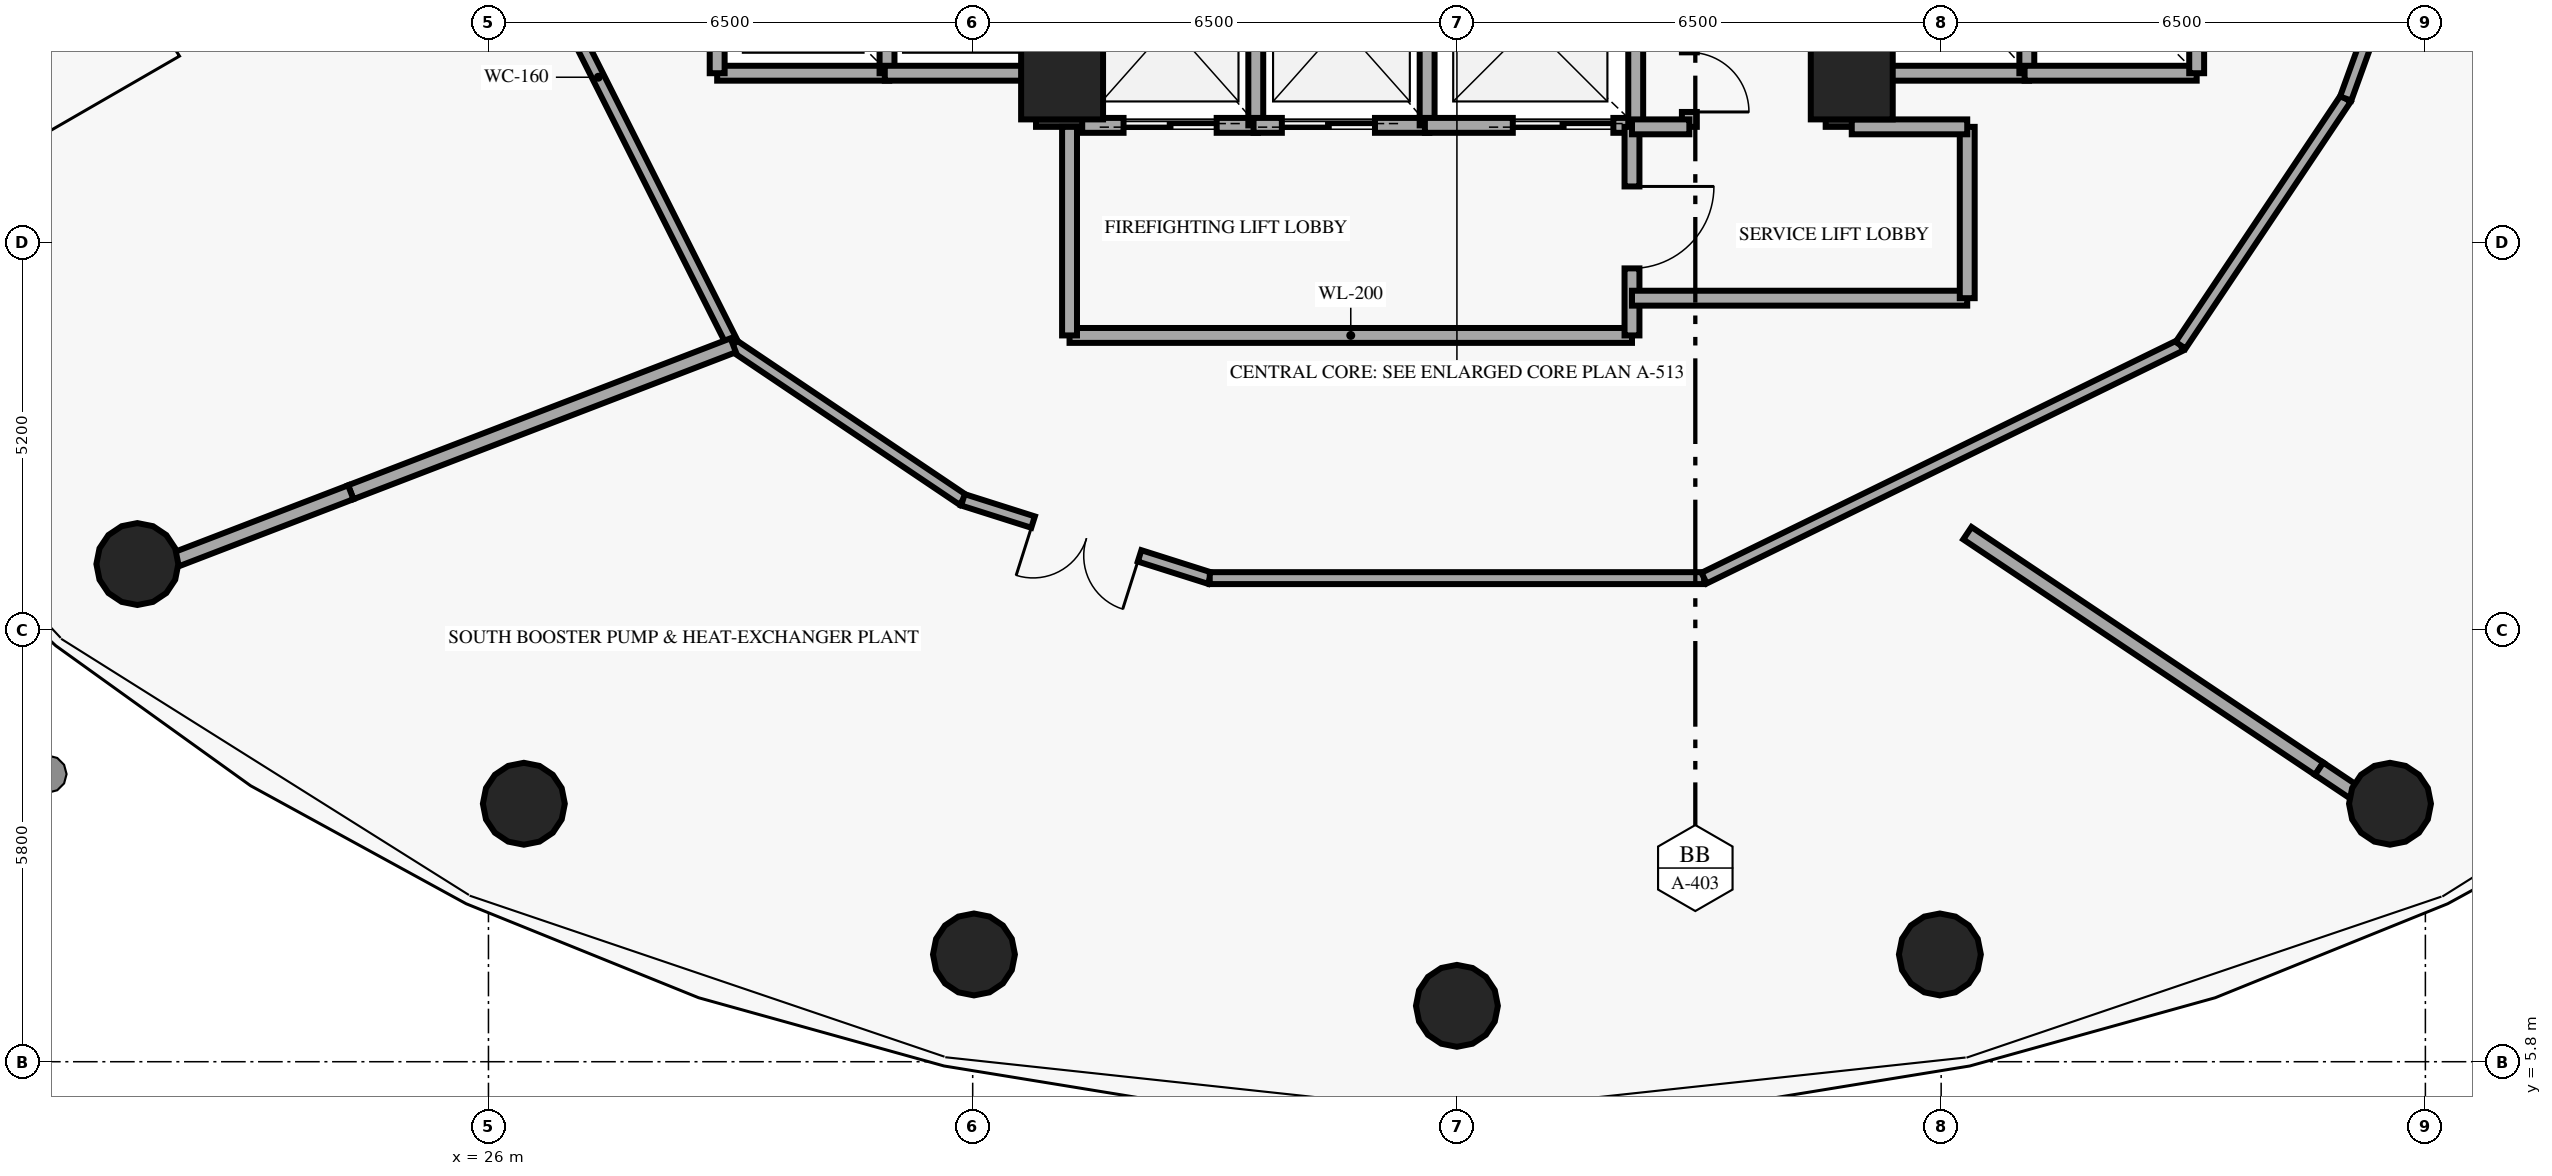
"""IFC4 building model, lengths in metres.
Left out: names, types, materials, properties, quantities, classifications, styles, units other than length and angle.
Written with IfcOpenShell. Run it as: python <this file> out.ifc"""

import sys

from ifc_helpers import new_model, si_unit, direction, frame, frame_2d, origin, origin_2d, place, context, subcontext, project, spatial, rectangle, circle, extrude, element, fill, save


model = new_model("IFC4")
c1 = context("Model", 3, precision=1e-05, world=origin(), true_north=direction((0.0, 1.0)))
c2 = subcontext(c1, "Body", "Model", "MODEL_VIEW")
j1 = project(units=[si_unit("LENGTHUNIT", "METRE"), si_unit("PLANEANGLEUNIT", "RADIAN")], contexts=[c1])
p1 = place(None, origin())
s1 = spatial("IfcSite", under=j1, at=p1, CompositionType="ELEMENT")
p2 = place(p1, origin())
s2 = spatial("IfcBuilding", under=s1, at=p2, CompositionType="ELEMENT")
p3 = place(p2, frame((0.0, 0.0, 106.05)))
s3 = spatial("IfcBuildingStorey", under=s2, at=p3, CompositionType="ELEMENT", Elevation=106.05)
for number, where, z_axis, x_axis in (
    (1, (33.7, 19.0, 0.0), (0.0, 0.0, 1.0), (1.0, 0.0, 0.0)),
    (2, (44.3, 19.0, 0.0), (0.0, 0.0, 1.0), (1.0, 0.0, 0.0)),
):
    element("IfcColumn", number, at=place(p3, frame(where, z_axis=z_axis, x_axis=x_axis)), inside=s3, PredefinedType="PILASTER", context=c2, shape_type="SweptSolid", body=[
        extrude(rectangle(XDim=1.1, YDim=1.1, at=origin_2d()), origin(), (0.0, 0.0, 1.0), 6.88),
    ])
for number, where, z_axis, x_axis in (
    (3, (21.287, 12.481, 0.0), (0.0, 0.0, 1.0), (1.0, 0.0, 0.0)),
    (4, (26.475, 9.263, 0.0), (0.0, 0.0, 1.0), (1.0, 0.0, 0.0)),
    (5, (32.517, 7.24, 0.0), (0.0, 0.0, 1.0), (1.0, 0.0, 0.0)),
    (6, (39.0, 6.55, 0.0), (0.0, 0.0, 1.0), (1.0, 0.0, 0.0)),
    (7, (45.483, 7.24, 0.0), (0.0, 0.0, 1.0), (1.0, 0.0, 0.0)),
    (8, (51.525, 9.263, 0.0), (0.0, 0.0, 1.0), (1.0, 0.0, 0.0)),
):
    element("IfcColumn", number, at=place(p3, frame(where, z_axis=z_axis, x_axis=x_axis)), inside=s3, PredefinedType="COLUMN", context=c2, shape_type="SweptSolid", body=[
        extrude(circle(Radius=0.55, at=origin_2d()), origin(), (0.0, 0.0, 1.0), 6.88),
    ])
for number, where, z_axis, x_axis in (
    (9, (33.7, 18.35, 0.0), (0.0, 0.0, 1.0), (0.0, 1.0, 0.0)),
    (10, (44.3, 18.35, 0.0), (0.0, 0.0, 1.0), (0.0, 1.0, 0.0)),
):
    element("IfcWall", number, at=place(p3, frame(where, z_axis=z_axis, x_axis=x_axis)), inside=s3, PredefinedType="SHEAR", context=c2, shape_type="SweptSolid", body=[
        extrude(rectangle(XDim=2.95, YDim=0.7, at=frame_2d((1.475, 0.0))), origin(), (0.0, 0.0, 1.0), 6.88),
    ])
for number, where, z_axis, x_axis in (
    (11, (29.07, 19.07, 0.0), (0.0, 0.0, 1.0), (1.0, 0.0, 0.0)),
    (12, (29.07, 19.07, 0.0), (0.0, 0.0, 1.0), (0.0, 1.0, 0.0)),
    (13, (31.35, 19.07, 0.0), (0.0, 0.0, 1.0), (0.0, 1.0, 0.0)),
):
    element("IfcWall", number, at=place(p3, frame(where, z_axis=z_axis, x_axis=x_axis)), inside=s3, PredefinedType="SOLIDWALL", context=c2, shape_type="SweptSolid", body=[
        extrude(rectangle(XDim=2.31, YDim=0.2, at=frame_2d((1.155, 0.0))), origin(), (0.0, 0.0, 1.0), 6.88),
    ])
for number, where, z_axis, x_axis in (
    (14, (31.32, 19.07, 0.0), (0.0, 0.0, 1.0), (1.0, 0.0, 0.0)),
    (15, (44.57, 19.07, 0.0), (0.0, 0.0, 1.0), (1.0, 0.0, 0.0)),
):
    element("IfcWall", number, at=place(p3, frame(where, z_axis=z_axis, x_axis=x_axis)), inside=s3, PredefinedType="SOLIDWALL", context=c2, shape_type="SweptSolid", body=[
        extrude(rectangle(XDim=2.11, YDim=0.2, at=frame_2d((1.055, 0.0))), origin(), (0.0, 0.0, 1.0), 6.88),
    ])
for number, where, z_axis, x_axis in (
    (16, (46.65, 19.07, 0.0), (0.0, 0.0, 1.0), (0.0, 1.0, 0.0)),
    (17, (46.62, 19.07, 0.0), (0.0, 0.0, 1.0), (1.0, 0.0, 0.0)),
    (18, (48.93, 19.07, 0.0), (0.0, 0.0, 1.0), (0.0, 1.0, 0.0)),
):
    element("IfcWall", number, at=place(p3, frame(where, z_axis=z_axis, x_axis=x_axis)), inside=s3, PredefinedType="SOLIDWALL", context=c2, shape_type="SweptSolid", body=[
        extrude(rectangle(XDim=2.31, YDim=0.2, at=frame_2d((1.155, 0.0))), origin(), (0.0, 0.0, 1.0), 6.88),
    ])
p4 = place(p3, frame((33.97, 18.37, 0.0), z_axis=(0.0, 0.0, 1.0), x_axis=(1.0, 0.0, 0.0)))
e19 = element("IfcWall", 19, at=p4, inside=s3, PredefinedType="SOLIDWALL", context=c2, shape_type="SweptSolid", body=[
    extrude(rectangle(XDim=2.36, YDim=0.2, at=frame_2d((1.18, 0.0))), origin(), (0.0, 0.0, 1.0), 6.88),
])
p5 = place(p4, frame((0.555, 0.0, 0.0)))
e20 = element("IfcOpeningElement", 20, at=p5, cuts=e19, PredefinedType="OPENING", context=c2, shape_type="SweptSolid", body=[
    extrude(rectangle(XDim=1.25, YDim=2.2, at=frame_2d((0.625, 1.1))), frame((0.0, 0.11, 0.0), z_axis=(0.0, -1.0, 0.0), x_axis=(1.0, 0.0, 0.0)), (0.0, 0.0, 1.0), 0.22),
])
p6 = place(p3, frame((36.3, 18.37, 0.0), z_axis=(0.0, 0.0, 1.0), x_axis=(0.0, 1.0, 0.0)))
e21 = element("IfcWall", 21, at=p6, inside=s3, PredefinedType="SOLIDWALL", context=c2, shape_type="SweptSolid", body=[
    extrude(rectangle(XDim=2.71, YDim=0.2, at=frame_2d((1.355, 0.0))), origin(), (0.0, 0.0, 1.0), 6.88),
])
p7 = place(p3, frame((36.27, 18.37, 0.0), z_axis=(0.0, 0.0, 1.0), x_axis=(1.0, 0.0, 0.0)))
e22 = element("IfcWall", 22, at=p7, inside=s3, PredefinedType="SOLIDWALL", context=c2, shape_type="SweptSolid", body=[
    extrude(rectangle(XDim=2.36, YDim=0.2, at=frame_2d((1.18, 0.0))), origin(), (0.0, 0.0, 1.0), 6.88),
])
p8 = place(p7, frame((0.38, 0.0, 0.0)))
e23 = element("IfcOpeningElement", 23, at=p8, cuts=e22, PredefinedType="OPENING", context=c2, shape_type="SweptSolid", body=[
    extrude(rectangle(XDim=1.25, YDim=2.2, at=frame_2d((0.625, 1.1))), frame((0.0, 0.11, 0.0), z_axis=(0.0, -1.0, 0.0), x_axis=(1.0, 0.0, 0.0)), (0.0, 0.0, 1.0), 0.22),
])
p9 = place(p3, frame((38.6, 18.37, 0.0), z_axis=(0.0, 0.0, 1.0), x_axis=(0.0, 1.0, 0.0)))
e24 = element("IfcWall", 24, at=p9, inside=s3, PredefinedType="SOLIDWALL", context=c2, shape_type="SweptSolid", body=[
    extrude(rectangle(XDim=2.71, YDim=0.2, at=frame_2d((1.355, 0.0))), origin(), (0.0, 0.0, 1.0), 6.88),
])
p10 = place(p3, frame((38.57, 18.37, 0.0), z_axis=(0.0, 0.0, 1.0), x_axis=(1.0, 0.0, 0.0)))
e25 = element("IfcWall", 25, at=p10, inside=s3, PredefinedType="SOLIDWALL", context=c2, shape_type="SweptSolid", body=[
    extrude(rectangle(XDim=2.83, YDim=0.2, at=frame_2d((1.415, 0.0))), origin(), (0.0, 0.0, 1.0), 6.88),
])
p11 = place(p10, frame((1.18, 0.0, 0.0)))
e26 = element("IfcOpeningElement", 26, at=p11, cuts=e25, PredefinedType="OPENING", context=c2, shape_type="SweptSolid", body=[
    extrude(rectangle(XDim=1.35, YDim=2.18, at=frame_2d((0.675, 1.09))), frame((0.0, 0.11, 0.0), z_axis=(0.0, -1.0, 0.0), x_axis=(1.0, 0.0, 0.0)), (0.0, 0.0, 1.0), 0.22),
])
p12 = place(p3, frame((41.4, 18.37, 0.0), z_axis=(0.0, 0.0, 1.0), x_axis=(0.0, 1.0, 0.0)))
e27 = element("IfcWall", 27, at=p12, inside=s3, PredefinedType="SOLIDWALL", context=c2, shape_type="SweptSolid", body=[
    extrude(rectangle(XDim=2.71, YDim=0.2, at=frame_2d((1.355, 0.0))), origin(), (0.0, 0.0, 1.0), 6.88),
])
p13 = place(p3, frame((33.8, 15.55, 0.0), z_axis=(0.0, 0.0, 1.0), x_axis=(1.0, 0.0, 0.0)))
e28 = element("IfcWall", 28, at=p13, inside=s3, PredefinedType="SOLIDWALL", context=c2, shape_type="SweptSolid", body=[
    extrude(rectangle(XDim=7.55, YDim=0.2, at=frame_2d((3.775, 0.0))), origin(), (0.0, 0.0, 1.0), 6.88),
])
p14 = place(p3, frame((33.8, 15.55, 0.0), z_axis=(0.0, 0.0, 1.0), x_axis=(0.0, 1.0, 0.0)))
e29 = element("IfcWall", 29, at=p14, inside=s3, PredefinedType="SOLIDWALL", context=c2, shape_type="SweptSolid", body=[
    extrude(rectangle(XDim=2.8, YDim=0.2, at=frame_2d((1.4, 0.0))), origin(), (0.0, 0.0, 1.0), 6.88),
])
p15 = place(p3, frame((41.35, 15.55, 0.0), z_axis=(0.0, 0.0, 1.0), x_axis=(0.0, 1.0, 0.0)))
e30 = element("IfcWall", 30, at=p15, inside=s3, PredefinedType="SOLIDWALL", context=c2, shape_type="SweptSolid", body=[
    extrude(rectangle(XDim=2.8, YDim=0.2, at=frame_2d((1.4, 0.0))), origin(), (0.0, 0.0, 1.0), 6.88),
])
p16 = place(p15, frame((0.9, 0.0, 0.0)))
e31 = element("IfcOpeningElement", 31, at=p16, cuts=e30, PredefinedType="OPENING", context=c2, shape_type="SweptSolid", body=[
    extrude(rectangle(XDim=1.1, YDim=2.15, at=frame_2d((0.55, 1.075))), frame((0.0, 0.11, 0.0), z_axis=(0.0, -1.0, 0.0), x_axis=(1.0, 0.0, 0.0)), (0.0, 0.0, 1.0), 0.22),
])
p17 = place(p3, frame((41.35, 16.05, 0.0), z_axis=(0.0, 0.0, 1.0), x_axis=(1.0, 0.0, 0.0)))
e32 = element("IfcWall", 32, at=p17, inside=s3, PredefinedType="SOLIDWALL", context=c2, shape_type="SweptSolid", body=[
    extrude(rectangle(XDim=4.5, YDim=0.2, at=frame_2d((2.25, 0.0))), origin(), (0.0, 0.0, 1.0), 6.88),
])
p18 = place(p3, frame((45.85, 16.05, 0.0), z_axis=(0.0, 0.0, 1.0), x_axis=(0.0, 1.0, 0.0)))
e33 = element("IfcWall", 33, at=p18, inside=s3, PredefinedType="SOLIDWALL", context=c2, shape_type="SweptSolid", body=[
    extrude(rectangle(XDim=2.3, YDim=0.2, at=frame_2d((1.15, 0.0))), origin(), (0.0, 0.0, 1.0), 6.88),
])
p19 = place(p3, frame((44.3, 18.35, 0.0), z_axis=(0.0, 0.0, 1.0), x_axis=(1.0, 0.0, 0.0)))
e34 = element("IfcWall", 34, at=p19, inside=s3, PredefinedType="SOLIDWALL", context=c2, shape_type="SweptSolid", body=[
    extrude(rectangle(XDim=1.55, YDim=0.2, at=frame_2d((0.775, 0.0))), origin(), (0.0, 0.0, 1.0), 6.88),
])
p20 = place(p3, frame((42.12, 18.35, 0.0), z_axis=(0.0, 0.0, 1.0), x_axis=(0.0, 1.0, 0.0)))
e35 = element("IfcWall", 35, at=p20, inside=s3, PredefinedType="SOLIDWALL", context=c2, shape_type="SweptSolid", body=[
    extrude(rectangle(XDim=2.95, YDim=0.2, at=frame_2d((1.475, 0.0))), origin(), (0.0, 0.0, 1.0), 6.88),
])
p21 = place(p20, frame((0.2, 0.0, 0.0)))
e36 = element("IfcOpeningElement", 36, at=p21, cuts=e35, PredefinedType="OPENING", context=c2, shape_type="SweptSolid", body=[
    extrude(rectangle(XDim=0.8, YDim=2.05, at=frame_2d((0.4, 1.025))), frame((0.0, 0.11, 0.0), z_axis=(0.0, -1.0, 0.0), x_axis=(1.0, 0.0, 0.0)), (0.0, 0.0, 1.0), 0.22),
])
p22 = place(p3, frame((41.35, 18.35, 0.0), z_axis=(0.0, 0.0, 1.0), x_axis=(1.0, 0.0, 0.0)))
e37 = element("IfcWall", 37, at=p22, inside=s3, PredefinedType="SOLIDWALL", context=c2, shape_type="SweptSolid", body=[
    extrude(rectangle(XDim=0.77, YDim=0.2, at=frame_2d((0.385, 0.0))), origin(), (0.0, 0.0, 1.0), 6.88),
])
p23 = place(p3, frame((25.663, 22.614, 0.0), z_axis=(0.0, 0.0, 1.0), x_axis=(0.449672541353, -0.893193487187, 0.0)))
e38 = element("IfcWall", 38, at=p23, inside=s3, PredefinedType="PARTITIONING", context=c2, shape_type="SweptSolid", body=[
    extrude(rectangle(XDim=8.057, YDim=0.16, at=frame_2d((4.028, 0.0))), origin(), (0.0, 0.0, 1.0), 6.88),
])
p24 = place(p3, frame((29.286, 15.418, 0.0), z_axis=(0.0, 0.0, 1.0), x_axis=(0.829606474383, -0.558348544962, 0.0)))
e39 = element("IfcWall", 39, at=p24, inside=s3, PredefinedType="PARTITIONING", context=c2, shape_type="SweptSolid", body=[
    extrude(rectangle(XDim=3.716, YDim=0.16, at=frame_2d((1.858, 0.0))), origin(), (0.0, 0.0, 1.0), 6.88),
])
p25 = place(p3, frame((35.682, 12.292, 0.0), z_axis=(0.0, 0.0, 1.0), x_axis=(-0.953183734956, 0.302391744951, 0.0)))
e40 = element("IfcWall", 40, at=p25, inside=s3, PredefinedType="PARTITIONING", context=c2, shape_type="SweptSolid", body=[
    extrude(rectangle(XDim=3.476, YDim=0.16, at=frame_2d((1.738, 0.0))), origin(), (0.0, 0.0, 1.0), 6.88),
])
p26 = place(p25, frame((0.988, 0.0, 0.0)))
e41 = element("IfcOpeningElement", 41, at=p26, cuts=e40, PredefinedType="OPENING", context=c2, shape_type="SweptSolid", body=[
    extrude(rectangle(XDim=1.5, YDim=2.2, at=frame_2d((0.75, 1.1))), frame((0.0, 0.09, 0.0), z_axis=(0.0, -1.0, 0.0), x_axis=(1.0, 0.0, 0.0)), (0.0, 0.0, 1.0), 0.18),
])
p27 = place(p3, frame((35.682, 12.292, 0.0), z_axis=(0.0, 0.0, 1.0), x_axis=(1.0, 0.0, 0.0)))
e42 = element("IfcWall", 42, at=p27, inside=s3, PredefinedType="PARTITIONING", context=c2, shape_type="SweptSolid", body=[
    extrude(rectangle(XDim=6.636, YDim=0.16, at=frame_2d((3.318, 0.0))), origin(), (0.0, 0.0, 1.0), 6.88),
])
p28 = place(p3, frame((42.318, 12.292, 0.0), z_axis=(0.0, 0.0, 1.0), x_axis=(0.898437278598, 0.439101874768, 0.0)))
e43 = element("IfcWall", 43, at=p28, inside=s3, PredefinedType="PARTITIONING", context=c2, shape_type="SweptSolid", body=[
    extrude(rectangle(XDim=7.119, YDim=0.16, at=frame_2d((3.56, 0.0))), origin(), (0.0, 0.0, 1.0), 6.88),
])
p29 = place(p3, frame((48.714, 15.418, 0.0), z_axis=(0.0, 0.0, 1.0), x_axis=(0.556056751682, 0.831144324958, 0.0)))
e44 = element("IfcWall", 44, at=p29, inside=s3, PredefinedType="PARTITIONING", context=c2, shape_type="SweptSolid", body=[
    extrude(rectangle(XDim=3.985, YDim=0.16, at=frame_2d((1.992, 0.0))), origin(), (0.0, 0.0, 1.0), 6.88),
])
p30 = place(p3, frame((52.337, 22.614, 0.0), z_axis=(0.0, 0.0, 1.0), x_axis=(-0.34058972089, -0.940212019719, 0.0)))
e45 = element("IfcWall", 45, at=p30, inside=s3, PredefinedType="PARTITIONING", context=c2, shape_type="SweptSolid", body=[
    extrude(rectangle(XDim=4.131, YDim=0.16, at=frame_2d((2.065, 0.0))), origin(), (0.0, 0.0, 1.0), 6.88),
])
p31 = place(p30, frame((1.315, 0.0, 0.0)))
e46 = element("IfcOpeningElement", 46, at=p31, cuts=e45, PredefinedType="OPENING", context=c2, shape_type="SweptSolid", body=[
    extrude(rectangle(XDim=1.5, YDim=2.2, at=frame_2d((0.75, 1.1))), frame((0.0, 0.09, 0.0), z_axis=(0.0, -1.0, 0.0), x_axis=(1.0, 0.0, 0.0)), (0.0, 0.0, 1.0), 0.18),
])
p32 = place(p3, frame((29.286, 15.418, 0.0), z_axis=(0.0, 0.0, 1.0), x_axis=(-0.933445105903, -0.358720273007, 0.0)))
e47 = element("IfcWall", 47, at=p32, inside=s3, PredefinedType="SOLIDWALL", context=c2, shape_type="SweptSolid", body=[
    extrude(rectangle(XDim=5.5, YDim=0.2, at=frame_2d((2.75, 0.0))), origin(), (0.0, 0.0, 1.0), 6.88),
])
p33 = place(p3, frame((24.152, 13.445, 0.0), z_axis=(0.0, 0.0, 1.0), x_axis=(-0.933419760617, -0.358786218367, 0.0)))
e48 = element("IfcWall", 48, at=p33, inside=s3, PredefinedType="SOLIDWALL", context=c2, shape_type="SweptSolid", body=[
    extrude(rectangle(XDim=3.308, YDim=0.2, at=frame_2d((1.654, 0.0))), origin(), (0.0, 0.0, 1.0), 5.08),
])
p34 = place(p3, frame((45.852, 12.895, 0.0), z_axis=(0.0, 0.0, 1.0), x_axis=(0.830898487363, -0.55642403228, 0.0)))
e49 = element("IfcWall", 49, at=p34, inside=s3, PredefinedType="SOLIDWALL", context=c2, shape_type="SweptSolid", body=[
    extrude(rectangle(XDim=5.683, YDim=0.2, at=frame_2d((2.841, 0.0))), origin(), (0.0, 0.0, 1.0), 6.88),
])
p35 = place(p3, frame((50.574, 9.733, 0.0), z_axis=(0.0, 0.0, 1.0), x_axis=(0.830838472421, -0.556513641113, 0.0)))
e50 = element("IfcWall", 50, at=p35, inside=s3, PredefinedType="SOLIDWALL", context=c2, shape_type="SweptSolid", body=[
    extrude(rectangle(XDim=1.335, YDim=0.2, at=frame_2d((0.667, 0.0))), origin(), (0.0, 0.0, 1.0), 5.53),
])
p36 = place(p5, origin())
e51 = element("IfcDoor", 51, at=p36, inside=s3, OperationType="DOUBLE_DOOR_SLIDING", PredefinedType="DOOR", context=c2, shape_type="SweptSolid", body=[
    extrude(rectangle(XDim=1.25, YDim=2.2, at=frame_2d((0.625, 1.1))), frame((0.0, 0.025, 0.0), z_axis=(0.0, -1.0, 0.0), x_axis=(1.0, 0.0, 0.0)), (0.0, 0.0, 1.0), 0.05),
])
fill(e20, e51)
p37 = place(p8, origin())
e52 = element("IfcDoor", 52, at=p37, inside=s3, OperationType="DOUBLE_DOOR_SLIDING", PredefinedType="DOOR", context=c2, shape_type="SweptSolid", body=[
    extrude(rectangle(XDim=1.25, YDim=2.2, at=frame_2d((0.625, 1.1))), frame((0.0, 0.025, 0.0), z_axis=(0.0, -1.0, 0.0), x_axis=(1.0, 0.0, 0.0)), (0.0, 0.0, 1.0), 0.05),
])
fill(e23, e52)
p38 = place(p11, origin())
e53 = element("IfcDoor", 53, at=p38, inside=s3, OperationType="DOUBLE_DOOR_SLIDING", PredefinedType="DOOR", context=c2, shape_type="SweptSolid", body=[
    extrude(rectangle(XDim=1.35, YDim=2.18, at=frame_2d((0.675, 1.09))), frame((0.0, 0.025, 0.0), z_axis=(0.0, -1.0, 0.0), x_axis=(1.0, 0.0, 0.0)), (0.0, 0.0, 1.0), 0.05),
])
fill(e26, e53)
p39 = place(p16, origin())
e54 = element("IfcDoor", 54, at=p39, inside=s3, OperationType="SINGLE_SWING_RIGHT", PredefinedType="DOOR", context=c2, shape_type="SweptSolid", body=[
    extrude(rectangle(XDim=1.1, YDim=2.15, at=frame_2d((0.55, 1.075))), frame((0.0, 0.025, 0.0), z_axis=(0.0, -1.0, 0.0), x_axis=(1.0, 0.0, 0.0)), (0.0, 0.0, 1.0), 0.05),
])
fill(e31, e54)
p40 = place(p21, origin())
e55 = element("IfcDoor", 55, at=p40, inside=s3, OperationType="SINGLE_SWING_LEFT", PredefinedType="DOOR", context=c2, shape_type="SweptSolid", body=[
    extrude(rectangle(XDim=0.8, YDim=2.05, at=frame_2d((0.4, 1.025))), frame((0.0, 0.025, 0.0), z_axis=(0.0, -1.0, 0.0), x_axis=(1.0, 0.0, 0.0)), (0.0, 0.0, 1.0), 0.05),
])
fill(e36, e55)
p41 = place(p26, origin())
e56 = element("IfcDoor", 56, at=p41, inside=s3, OperationType="DOUBLE_DOOR_SINGLE_SWING", PredefinedType="DOOR", context=c2, shape_type="SweptSolid", body=[
    extrude(rectangle(XDim=1.5, YDim=2.2, at=frame_2d((0.75, 1.1))), frame((0.0, 0.025, 0.0), z_axis=(0.0, -1.0, 0.0), x_axis=(1.0, 0.0, 0.0)), (0.0, 0.0, 1.0), 0.05),
])
fill(e41, e56)
save(model, sys.argv[1])
